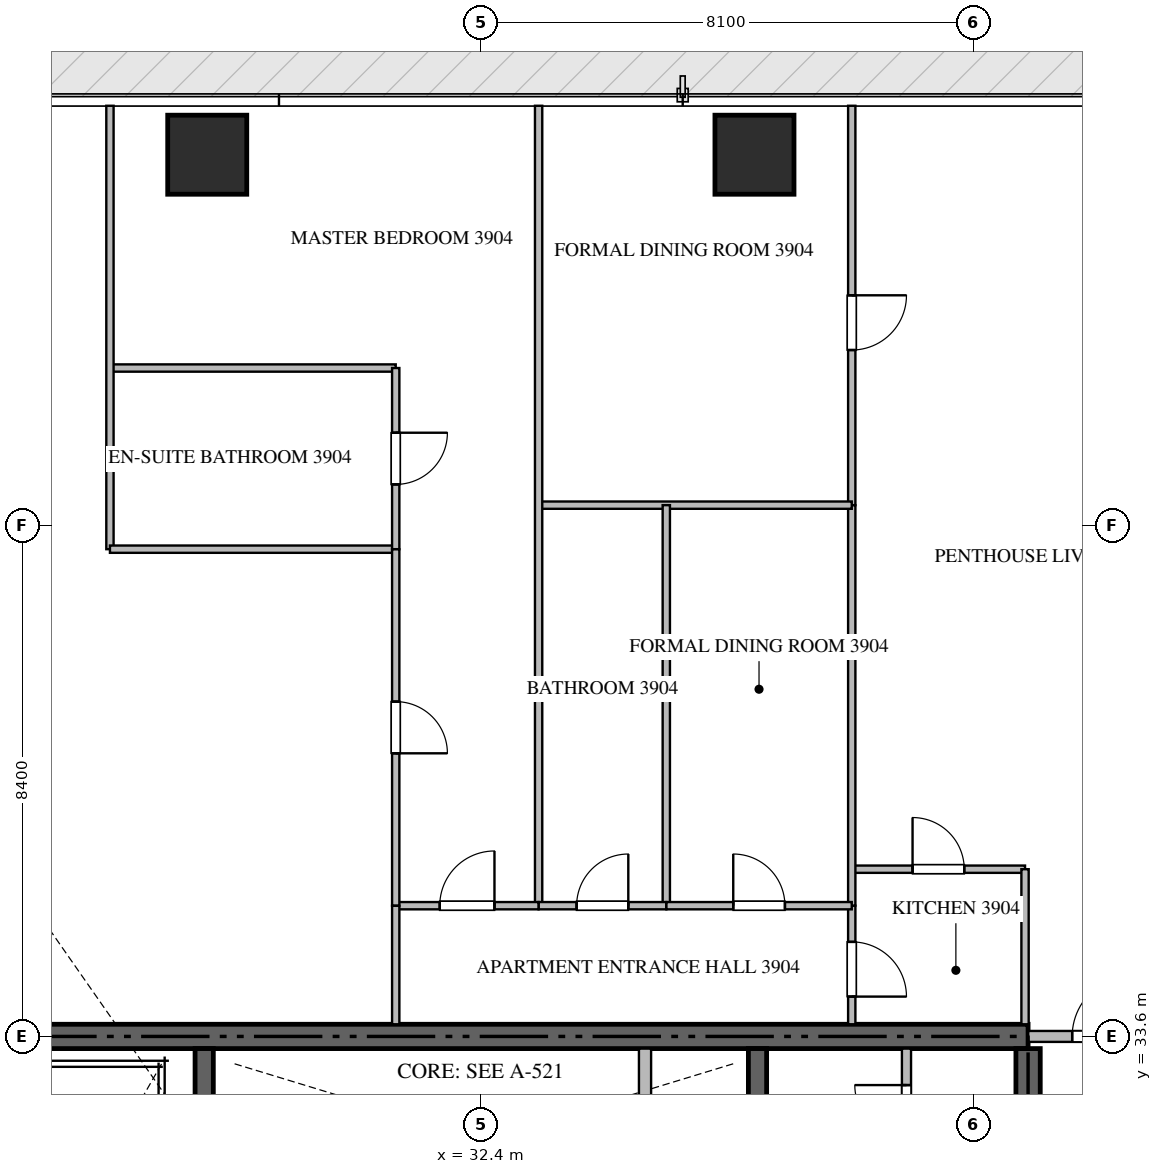
"""IFC4 building model, lengths in metres.
Left out: names, types, materials, properties, quantities, classifications, styles, units other than length and angle.
Written with IfcOpenShell. Run it as: python <this file> out.ifc"""

import sys

from ifc_helpers import new_model, si_unit, direction, frame, frame_2d, origin, origin_2d, place, context, subcontext, project, spatial, rectangle, extrude, source, transform, mapped, element, fill, save


model = new_model("IFC4")
c1 = context("Model", 3, precision=1e-05, world=origin(), true_north=direction((0.0, 1.0)))
c2 = subcontext(c1, "Body", "Model", "MODEL_VIEW")
j1 = project(units=[si_unit("LENGTHUNIT", "METRE"), si_unit("PLANEANGLEUNIT", "RADIAN")], contexts=[c1])
p1 = place(None, origin())
s1 = spatial("IfcSite", under=j1, at=p1, CompositionType="ELEMENT")
p2 = place(p1, origin())
s2 = spatial("IfcBuilding", under=s1, at=p2, CompositionType="ELEMENT")
p3 = place(p2, frame((0.0, 0.0, 157.65)))
s3 = spatial("IfcBuildingStorey", under=s2, at=p3, CompositionType="ELEMENT", Elevation=157.65)
p4 = place(p3, frame((41.4, 33.6, -0.26), z_axis=(0.0, 0.0, 1.0), x_axis=(-1.0, 0.0, 0.0)))
e1 = element("IfcWall", 1, at=p4, inside=s3, PredefinedType="SHEAR", context=c2, shape_type="SweptSolid", body=[
    extrude(rectangle(XDim=18.0, YDim=0.4, at=frame_2d((9.0, 0.0))), origin(), (0.0, 0.0, 1.0), 3.748),
])
p5 = place(p3, frame((41.4, 27.75, -0.26), z_axis=(0.0, 0.0, 1.0), x_axis=(0.0, 1.0, 0.0)))
e2 = element("IfcWall", 2, at=p5, inside=s3, PredefinedType="SHEAR", context=c2, shape_type="SweptSolid", body=[
    extrude(rectangle(XDim=5.65, YDim=0.4, at=frame_2d((2.825, 0.0))), origin(), (0.0, 0.0, 1.0), 3.748),
])
p6 = place(p3, frame((27.85, 23.55, -0.26), z_axis=(0.0, 0.0, 1.0), x_axis=(0.0, 1.0, 0.0)))
e3 = element("IfcWall", 3, at=p6, inside=s3, PredefinedType="SHEAR", context=c2, shape_type="SweptSolid", body=[
    extrude(rectangle(XDim=9.85, YDim=0.3, at=frame_2d((4.925, 0.0))), origin(), (0.0, 0.0, 1.0), 3.748),
])
p7 = place(p3, frame((36.95, 27.05, -0.26), z_axis=(0.0, 0.0, 1.0), x_axis=(0.0, 1.0, 0.0)))
e4 = element("IfcWall", 4, at=p7, inside=s3, PredefinedType="SHEAR", context=c2, shape_type="SweptSolid", body=[
    extrude(rectangle(XDim=6.35, YDim=0.3, at=frame_2d((3.175, 0.0))), origin(), (0.0, 0.0, 1.0), 3.748),
])
m1 = source(origin(), c2, "Body", "SweptSolid", [
    extrude(rectangle(XDim=1.3, YDim=1.3, at=origin_2d()), origin(), (0.0, 0.0, 1.0), 3.75),
])
for number, where, z_axis, x_axis in (
    (5, (27.9, 48.1, -0.26), (0.0, 0.0, 1.0), (1.0, 0.0, 0.0)),
    (6, (36.9, 48.1, -0.26), (0.0, 0.0, 1.0), (1.0, 0.0, 0.0)),
):
    element("IfcColumn", number, at=place(p3, frame(where, z_axis=z_axis, x_axis=x_axis)), inside=s3, PredefinedType="COLUMN", context=c2, shape_type="MappedRepresentation", body=[
        mapped(m1, transform((0.0, 0.0, 0.0), scale=1.0)),
    ])
p8 = place(p3, frame((35.1, 30.75, 0.0), z_axis=(0.0, 0.0, 1.0), x_axis=(0.0, 1.0, 0.0)))
e7 = element("IfcWall", 7, at=p8, inside=s3, PredefinedType="STANDARD", context=c2, shape_type="SweptSolid", body=[
    extrude(rectangle(XDim=2.65, YDim=0.2, at=frame_2d((1.325, 0.0))), origin(), (0.0, 0.0, 1.0), 3.49),
])
p9 = place(p3, frame((39.4, 31.35, 0.0), z_axis=(0.0, 0.0, 1.0), x_axis=(0.0, 1.0, 0.0)))
e8 = element("IfcWall", 8, at=p9, inside=s3, PredefinedType="PARTITIONING", context=c2, shape_type="SweptSolid", body=[
    extrude(rectangle(XDim=2.05, YDim=0.15, at=frame_2d((1.025, 0.0))), origin(), (0.0, 0.0, 1.0), 3.49),
])
p10 = place(p9, frame((0.6, 0.0, 0.0)))
e9 = element("IfcOpeningElement", 9, at=p10, cuts=e8, PredefinedType="OPENING", context=c2, shape_type="SweptSolid", body=[
    extrude(rectangle(XDim=0.85, YDim=2.1, at=frame_2d((0.425, 1.05))), frame((0.0, 0.085, 0.0), z_axis=(0.0, -1.0, 0.0), x_axis=(1.0, 0.0, 0.0)), (0.0, 0.0, 1.0), 0.17),
])
p11 = place(p3, frame((41.402, 33.6, 0.0), z_axis=(0.0, 0.0, 1.0), x_axis=(1.0, 0.0, 0.0)))
e10 = element("IfcWall", 10, at=p11, inside=s3, PredefinedType="PARTITIONING", context=c2, shape_type="SweptSolid", body=[
    extrude(rectangle(XDim=2.446, YDim=0.18, at=frame_2d((1.223, 0.0))), origin(), (0.0, 0.0, 1.0), 3.49),
])
p12 = place(p11, frame((0.723, 0.0, 0.0)))
e11 = element("IfcOpeningElement", 11, at=p12, cuts=e10, PredefinedType="OPENING", context=c2, shape_type="SweptSolid", body=[
    extrude(rectangle(XDim=1.0, YDim=2.15, at=frame_2d((0.5, 1.075))), frame((0.0, 0.1, 0.0), z_axis=(0.0, -1.0, 0.0), x_axis=(1.0, 0.0, 0.0)), (0.0, 0.0, 1.0), 0.2),
])
p13 = place(p3, frame((38.5, 36.35, 0.0), z_axis=(0.0, 0.0, 1.0), x_axis=(1.0, 0.0, 0.0)))
e12 = element("IfcWall", 12, at=p13, inside=s3, PredefinedType="PARTITIONING", context=c2, shape_type="SweptSolid", body=[
    extrude(rectangle(XDim=2.85, YDim=0.12, at=frame_2d((1.425, 0.0))), origin(), (0.0, 0.0, 1.0), 3.49),
])
p14 = place(p13, frame((1.0, 0.0, 0.0)))
e13 = element("IfcOpeningElement", 13, at=p14, cuts=e12, PredefinedType="OPENING", context=c2, shape_type="SweptSolid", body=[
    extrude(rectangle(XDim=0.85, YDim=2.1, at=frame_2d((0.425, 1.05))), frame((0.0, 0.07, 0.0), z_axis=(0.0, -1.0, 0.0), x_axis=(1.0, 0.0, 0.0)), (0.0, 0.0, 1.0), 0.14),
])
p15 = place(p3, frame((41.35, 36.35, 0.0), z_axis=(0.0, 0.0, 1.0), x_axis=(0.0, -1.0, 0.0)))
e14 = element("IfcWall", 14, at=p15, inside=s3, PredefinedType="PARTITIONING", context=c2, shape_type="SweptSolid", body=[
    extrude(rectangle(XDim=2.55, YDim=0.12, at=frame_2d((1.275, 0.0))), origin(), (0.0, 0.0, 1.0), 3.49),
])
p16 = place(p3, frame((38.5, 35.75, 0.0), z_axis=(0.0, 0.0, 1.0), x_axis=(0.0, -1.0, 0.0)))
e15 = element("IfcWall", 15, at=p16, inside=s3, PredefinedType="PARTITIONING", context=c2, shape_type="SweptSolid", body=[
    extrude(rectangle(XDim=1.95, YDim=0.12, at=frame_2d((0.975, 0.0))), origin(), (0.0, 0.0, 1.0), 3.49),
])
p17 = place(p16, frame((0.595, 0.0, 0.0)))
e16 = element("IfcOpeningElement", 16, at=p17, cuts=e15, PredefinedType="OPENING", context=c2, shape_type="SweptSolid", body=[
    extrude(rectangle(XDim=0.9, YDim=2.1, at=frame_2d((0.45, 1.05))), frame((0.0, 0.07, 0.0), z_axis=(0.0, -1.0, 0.0), x_axis=(1.0, 0.0, 0.0)), (0.0, 0.0, 1.0), 0.14),
])
p18 = place(p3, frame((38.5, 48.905, 0.0), z_axis=(0.0, 0.0, 1.0), x_axis=(0.0, -1.0, 0.0)))
e17 = element("IfcWall", 17, at=p18, inside=s3, PredefinedType="PARTITIONING", context=c2, shape_type="SweptSolid", body=[
    extrude(rectangle(XDim=6.568, YDim=0.12, at=frame_2d((3.284, 0.0))), origin(), (0.0, 0.0, 1.0), 3.49),
])
p19 = place(p18, frame((3.117, 0.0, 0.0)))
e18 = element("IfcOpeningElement", 18, at=p19, cuts=e17, PredefinedType="OPENING", context=c2, shape_type="SweptSolid", body=[
    extrude(rectangle(XDim=0.9, YDim=2.1, at=frame_2d((0.45, 1.05))), frame((0.0, 0.07, 0.0), z_axis=(0.0, -1.0, 0.0), x_axis=(1.0, 0.0, 0.0)), (0.0, 0.0, 1.0), 0.14),
])
p20 = place(p3, frame((38.5, 42.335, 0.0), z_axis=(0.0, 0.0, 1.0), x_axis=(0.0, -1.0, 0.0)))
e19 = element("IfcWall", 19, at=p20, inside=s3, PredefinedType="PARTITIONING", context=c2, shape_type="SweptSolid", body=[
    extrude(rectangle(XDim=6.583, YDim=0.12, at=frame_2d((3.292, 0.0))), origin(), (0.0, 0.0, 1.0), 3.49),
])
p21 = place(p3, frame((33.35, 42.337, 0.0), z_axis=(0.0, 0.0, 1.0), x_axis=(1.0, 0.0, 0.0)))
e20 = element("IfcWall", 20, at=p21, inside=s3, PredefinedType="PARTITIONING", context=c2, shape_type="SweptSolid", body=[
    extrude(rectangle(XDim=5.15, YDim=0.12, at=frame_2d((2.575, 0.0))), origin(), (0.0, 0.0, 1.0), 3.49),
])
p22 = place(p3, frame((33.35, 48.905, 0.0), z_axis=(0.0, 0.0, 1.0), x_axis=(0.0, -1.0, 0.0)))
e21 = element("IfcWall", 21, at=p22, inside=s3, PredefinedType="PARTITIONING", context=c2, shape_type="SweptSolid", body=[
    extrude(rectangle(XDim=13.155, YDim=0.12, at=frame_2d((6.578, 0.0))), origin(), (0.0, 0.0, 1.0), 3.49),
])
p23 = place(p3, frame((35.45, 42.337, 0.0), z_axis=(0.0, 0.0, 1.0), x_axis=(0.0, -1.0, 0.0)))
e22 = element("IfcWall", 22, at=p23, inside=s3, PredefinedType="PARTITIONING", context=c2, shape_type="SweptSolid", body=[
    extrude(rectangle(XDim=6.587, YDim=0.12, at=frame_2d((3.293, 0.0))), origin(), (0.0, 0.0, 1.0), 3.49),
])
p24 = place(p3, frame((33.35, 35.75, 0.0), z_axis=(0.0, 0.0, 1.0), x_axis=(1.0, 0.0, 0.0)))
e23 = element("IfcWall", 23, at=p24, inside=s3, PredefinedType="PARTITIONING", context=c2, shape_type="SweptSolid", body=[
    extrude(rectangle(XDim=2.1, YDim=0.12, at=frame_2d((1.05, 0.0))), origin(), (0.0, 0.0, 1.0), 3.49),
])
p25 = place(p24, frame((0.625, 0.0, 0.0)))
e24 = element("IfcOpeningElement", 24, at=p25, cuts=e23, PredefinedType="OPENING", context=c2, shape_type="SweptSolid", body=[
    extrude(rectangle(XDim=0.85, YDim=2.1, at=frame_2d((0.425, 1.05))), frame((0.0, 0.07, 0.0), z_axis=(0.0, -1.0, 0.0), x_axis=(1.0, 0.0, 0.0)), (0.0, 0.0, 1.0), 0.14),
])
p26 = place(p3, frame((35.452, 35.75, 0.0), z_axis=(0.0, 0.0, 1.0), x_axis=(1.0, 0.0, 0.0)))
e25 = element("IfcWall", 25, at=p26, inside=s3, PredefinedType="PARTITIONING", context=c2, shape_type="SweptSolid", body=[
    extrude(rectangle(XDim=3.048, YDim=0.12, at=frame_2d((1.524, 0.0))), origin(), (0.0, 0.0, 1.0), 3.49),
])
p27 = place(p26, frame((1.099, 0.0, 0.0)))
e26 = element("IfcOpeningElement", 26, at=p27, cuts=e25, PredefinedType="OPENING", context=c2, shape_type="SweptSolid", body=[
    extrude(rectangle(XDim=0.85, YDim=2.1, at=frame_2d((0.425, 1.05))), frame((0.0, 0.07, 0.0), z_axis=(0.0, -1.0, 0.0), x_axis=(1.0, 0.0, 0.0)), (0.0, 0.0, 1.0), 0.14),
])
p28 = place(p3, frame((31.0, 35.75, 0.0), z_axis=(0.0, 0.0, 1.0), x_axis=(1.0, 0.0, 0.0)))
e27 = element("IfcWall", 27, at=p28, inside=s3, PredefinedType="PARTITIONING", context=c2, shape_type="SweptSolid", body=[
    extrude(rectangle(XDim=2.348, YDim=0.12, at=frame_2d((1.174, 0.0))), origin(), (0.0, 0.0, 1.0), 3.49),
])
p29 = place(p28, frame((0.724, 0.0, 0.0)))
e28 = element("IfcOpeningElement", 28, at=p29, cuts=e27, PredefinedType="OPENING", context=c2, shape_type="SweptSolid", body=[
    extrude(rectangle(XDim=0.9, YDim=2.1, at=frame_2d((0.45, 1.05))), frame((0.0, 0.07, 0.0), z_axis=(0.0, -1.0, 0.0), x_axis=(1.0, 0.0, 0.0)), (0.0, 0.0, 1.0), 0.14),
])
p30 = place(p3, frame((26.3, 44.592, 0.0), z_axis=(0.0, 0.0, 1.0), x_axis=(1.0, 0.0, 0.0)))
e29 = element("IfcWall", 29, at=p30, inside=s3, PredefinedType="PARTITIONING", context=c2, shape_type="SweptSolid", body=[
    extrude(rectangle(XDim=4.7, YDim=0.12, at=frame_2d((2.35, 0.0))), origin(), (0.0, 0.0, 1.0), 3.49),
])
p31 = place(p3, frame((26.3, 48.905, 0.0), z_axis=(0.0, 0.0, 1.0), x_axis=(0.0, -1.0, 0.0)))
e30 = element("IfcWall", 30, at=p31, inside=s3, PredefinedType="PARTITIONING", context=c2, shape_type="SweptSolid", body=[
    extrude(rectangle(XDim=7.292, YDim=0.12, at=frame_2d((3.646, 0.0))), origin(), (0.0, 0.0, 1.0), 3.49),
])
p32 = place(p3, frame((26.3, 41.613, 0.0), z_axis=(0.0, 0.0, 1.0), x_axis=(1.0, 0.0, 0.0)))
e31 = element("IfcWall", 31, at=p32, inside=s3, PredefinedType="PARTITIONING", context=c2, shape_type="SweptSolid", body=[
    extrude(rectangle(XDim=4.7, YDim=0.12, at=frame_2d((2.35, 0.0))), origin(), (0.0, 0.0, 1.0), 3.49),
])
p33 = place(p3, frame((31.0, 44.592, 0.0), z_axis=(0.0, 0.0, 1.0), x_axis=(0.0, -1.0, 0.0)))
e32 = element("IfcWall", 32, at=p33, inside=s3, PredefinedType="PARTITIONING", context=c2, shape_type="SweptSolid", body=[
    extrude(rectangle(XDim=2.979, YDim=0.12, at=frame_2d((1.49, 0.0))), origin(), (0.0, 0.0, 1.0), 3.49),
])
p34 = place(p33, frame((1.064, 0.0, 0.0)))
e33 = element("IfcOpeningElement", 33, at=p34, cuts=e32, PredefinedType="OPENING", context=c2, shape_type="SweptSolid", body=[
    extrude(rectangle(XDim=0.85, YDim=2.1, at=frame_2d((0.425, 1.05))), frame((0.0, 0.07, 0.0), z_axis=(0.0, -1.0, 0.0), x_axis=(1.0, 0.0, 0.0)), (0.0, 0.0, 1.0), 0.14),
])
p35 = place(p3, frame((31.0, 41.611, 0.0), z_axis=(0.0, 0.0, 1.0), x_axis=(0.0, -1.0, 0.0)))
e34 = element("IfcWall", 34, at=p35, inside=s3, PredefinedType="PARTITIONING", context=c2, shape_type="SweptSolid", body=[
    extrude(rectangle(XDim=5.861, YDim=0.12, at=frame_2d((2.931, 0.0))), origin(), (0.0, 0.0, 1.0), 3.49),
])
p36 = place(p35, frame((2.505, 0.0, 0.0)))
e35 = element("IfcOpeningElement", 35, at=p36, cuts=e34, PredefinedType="OPENING", context=c2, shape_type="SweptSolid", body=[
    extrude(rectangle(XDim=0.85, YDim=2.1, at=frame_2d((0.425, 1.05))), frame((0.0, 0.07, 0.0), z_axis=(0.0, -1.0, 0.0), x_axis=(1.0, 0.0, 0.0)), (0.0, 0.0, 1.0), 0.14),
])
p37 = place(p3, frame((31.0, 35.748, 0.0), z_axis=(0.0, 0.0, 1.0), x_axis=(0.0, -1.0, 0.0)))
e36 = element("IfcWall", 36, at=p37, inside=s3, PredefinedType="PARTITIONING", context=c2, shape_type="SweptSolid", body=[
    extrude(rectangle(XDim=1.948, YDim=0.12, at=frame_2d((0.974, 0.0))), origin(), (0.0, 0.0, 1.0), 3.49),
])
m2 = source(origin(), c2, "Body", "SweptSolid", [
    extrude(rectangle(XDim=0.85, YDim=2.1, at=frame_2d((0.425, 1.05))), frame((0.0, 0.025, 0.0), z_axis=(0.0, -1.0, 0.0), x_axis=(1.0, 0.0, 0.0)), (0.0, 0.0, 1.0), 0.05),
])
p38 = place(p10, origin())
e37 = element("IfcDoor", 37, at=p38, inside=s3, OperationType="SINGLE_SWING_RIGHT", PredefinedType="DOOR", context=c2, shape_type="MappedRepresentation", body=[
    mapped(m2, transform((0.0, 0.0, 0.0), scale=1.0)),
])
fill(e9, e37)
m3 = source(origin(), c2, "Body", "SweptSolid", [
    extrude(rectangle(XDim=1.0, YDim=2.15, at=frame_2d((0.5, 1.075))), frame((0.0, 0.025, 0.0), z_axis=(0.0, -1.0, 0.0), x_axis=(1.0, 0.0, 0.0)), (0.0, 0.0, 1.0), 0.05),
])
p39 = place(p12, origin())
e38 = element("IfcDoor", 38, at=p39, inside=s3, OperationType="SINGLE_SWING_RIGHT", PredefinedType="DOOR", context=c2, shape_type="MappedRepresentation", body=[
    mapped(m3, transform((0.0, 0.0, 0.0), scale=1.0)),
])
fill(e11, e38)
p40 = place(p14, origin())
e39 = element("IfcDoor", 39, at=p40, inside=s3, OperationType="SINGLE_SWING_LEFT", PredefinedType="DOOR", context=c2, shape_type="MappedRepresentation", body=[
    mapped(m2, transform((0.0, 0.0, 0.0), scale=1.0)),
])
fill(e13, e39)
m4 = source(origin(), c2, "Body", "SweptSolid", [
    extrude(rectangle(XDim=0.9, YDim=2.1, at=frame_2d((0.45, 1.05))), frame((0.0, 0.025, 0.0), z_axis=(0.0, -1.0, 0.0), x_axis=(1.0, 0.0, 0.0)), (0.0, 0.0, 1.0), 0.05),
])
p41 = place(p17, origin())
e40 = element("IfcDoor", 40, at=p41, inside=s3, OperationType="SINGLE_SWING_RIGHT", PredefinedType="DOOR", context=c2, shape_type="MappedRepresentation", body=[
    mapped(m4, transform((0.0, 0.0, 0.0), scale=1.0)),
])
fill(e16, e40)
p42 = place(p19, origin())
e41 = element("IfcDoor", 41, at=p42, inside=s3, OperationType="SINGLE_SWING_LEFT", PredefinedType="DOOR", context=c2, shape_type="MappedRepresentation", body=[
    mapped(m4, transform((0.0, 0.0, 0.0), scale=1.0)),
])
fill(e18, e41)
p43 = place(p25, origin())
e42 = element("IfcDoor", 42, at=p43, inside=s3, OperationType="SINGLE_SWING_RIGHT", PredefinedType="DOOR", context=c2, shape_type="MappedRepresentation", body=[
    mapped(m2, transform((0.0, 0.0, 0.0), scale=1.0)),
])
fill(e24, e42)
p44 = place(p27, origin())
e43 = element("IfcDoor", 43, at=p44, inside=s3, OperationType="SINGLE_SWING_LEFT", PredefinedType="DOOR", context=c2, shape_type="MappedRepresentation", body=[
    mapped(m2, transform((0.0, 0.0, 0.0), scale=1.0)),
])
fill(e26, e43)
p45 = place(p29, origin())
e44 = element("IfcDoor", 44, at=p45, inside=s3, OperationType="SINGLE_SWING_RIGHT", PredefinedType="DOOR", context=c2, shape_type="MappedRepresentation", body=[
    mapped(m4, transform((0.0, 0.0, 0.0), scale=1.0)),
])
fill(e28, e44)
p46 = place(p34, origin())
e45 = element("IfcDoor", 45, at=p46, inside=s3, OperationType="SINGLE_SWING_LEFT", PredefinedType="DOOR", context=c2, shape_type="MappedRepresentation", body=[
    mapped(m2, transform((0.0, 0.0, 0.0), scale=1.0)),
])
fill(e33, e45)
p47 = place(p36, origin())
e46 = element("IfcDoor", 46, at=p47, inside=s3, OperationType="SINGLE_SWING_RIGHT", PredefinedType="DOOR", context=c2, shape_type="MappedRepresentation", body=[
    mapped(m2, transform((0.0, 0.0, 0.0), scale=1.0)),
])
fill(e35, e46)
save(model, sys.argv[1])
